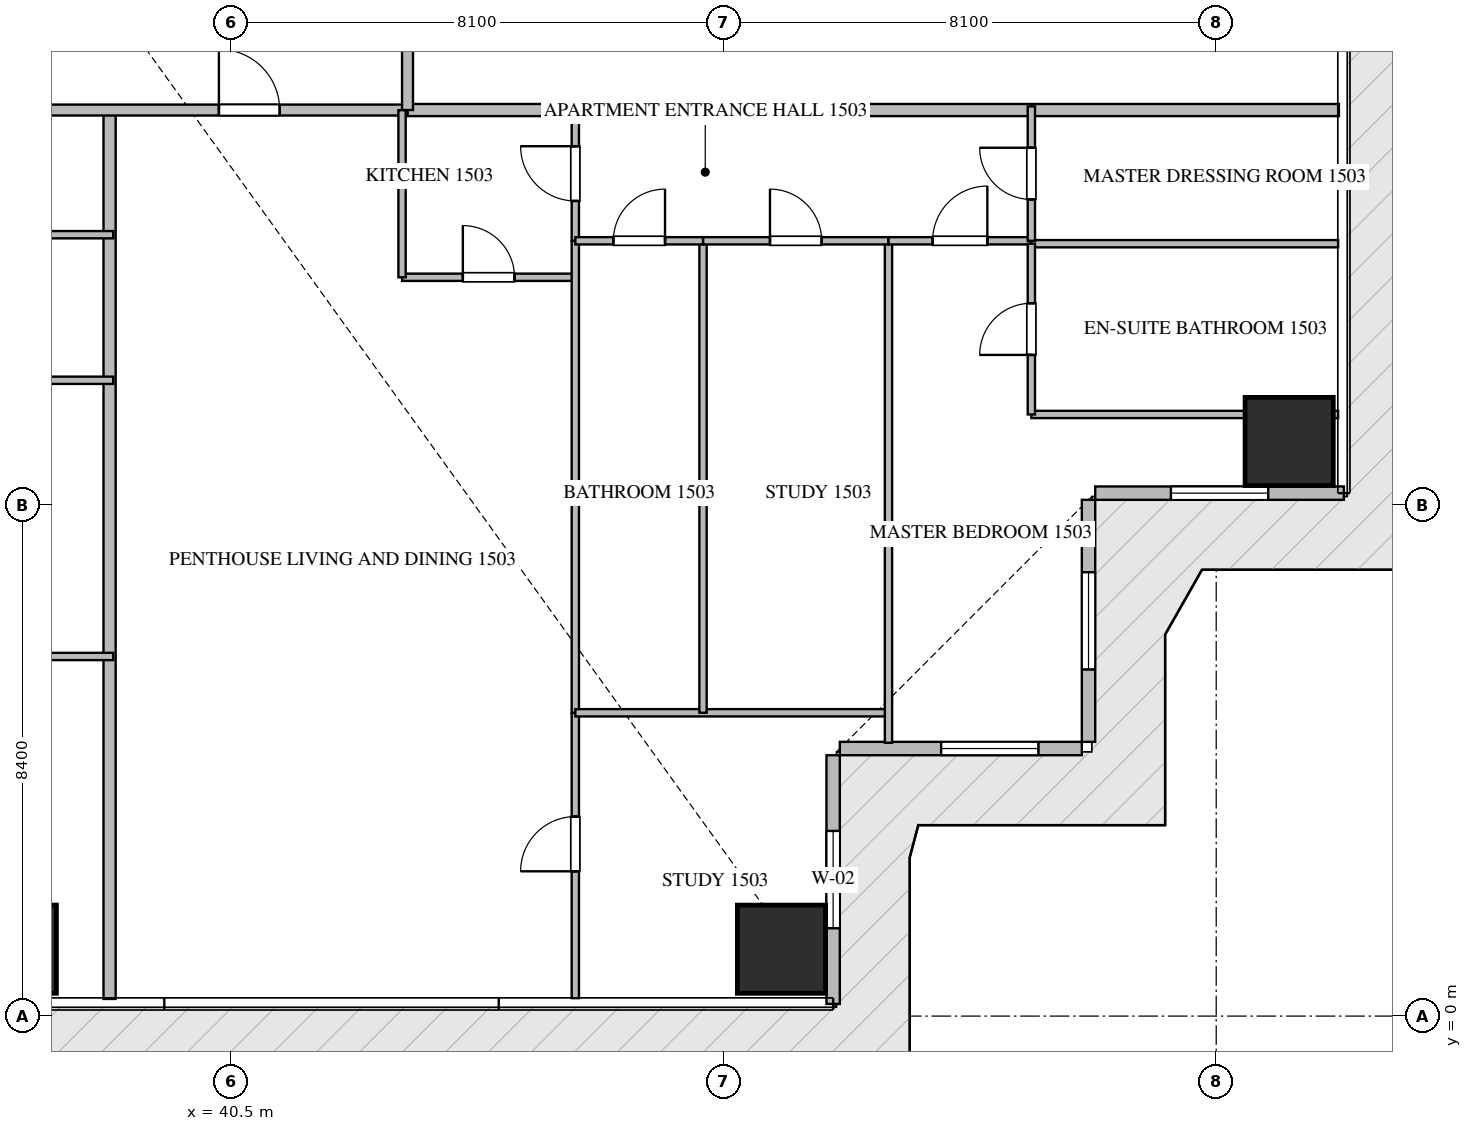
"""IFC4 building model, lengths in metres.
Left out: names, types, materials, properties, quantities, classifications, styles, units other than length and angle.
Written with IfcOpenShell. Run it as: python <this file> out.ifc"""

import sys

from ifc_helpers import new_model, si_unit, direction, frame, frame_2d, origin, origin_2d, place, context, subcontext, project, spatial, rectangle, extrude, source, transform, mapped, element, fill, save


model = new_model("IFC4")
c1 = context("Model", 3, precision=1e-05, world=origin(), true_north=direction((0.0, 1.0)))
c2 = subcontext(c1, "Body", "Model", "MODEL_VIEW")
j1 = project(units=[si_unit("LENGTHUNIT", "METRE"), si_unit("PLANEANGLEUNIT", "RADIAN")], contexts=[c1])
p1 = place(None, origin())
s1 = spatial("IfcSite", under=j1, at=p1, CompositionType="ELEMENT")
p2 = place(p1, origin())
s2 = spatial("IfcBuilding", under=s1, at=p2, CompositionType="ELEMENT")
p3 = place(p2, frame((0.0, 0.0, 64.2)))
s3 = spatial("IfcBuildingStorey", under=s2, at=p3, CompositionType="ELEMENT", Elevation=64.2)
m1 = source(origin(), c2, "Body", "SweptSolid", [
    extrude(rectangle(XDim=1.45, YDim=1.45, at=origin_2d()), origin(), (0.0, 0.0, 1.0), 3.75),
])
for number, where, z_axis, x_axis in (
    (1, (36.9, 1.1, -0.26), (0.0, 0.0, 1.0), (1.0, 0.0, 0.0)),
    (2, (49.55, 1.1, -0.26), (0.0, 0.0, 1.0), (1.0, 0.0, 0.0)),
    (3, (57.9, 9.45, -0.26), (0.0, 0.0, 1.0), (1.0, 0.0, 0.0)),
):
    element("IfcColumn", number, at=place(p3, frame(where, z_axis=z_axis, x_axis=x_axis)), inside=s3, PredefinedType="COLUMN", context=c2, shape_type="MappedRepresentation", body=[
        mapped(m1, transform((0.0, 0.0, 0.0), scale=1.0)),
    ])
p4 = place(p3, frame((50.4, 0.2, 0.0), z_axis=(0.0, 0.0, 1.0), x_axis=(0.0, 1.0, 0.0)))
e4 = element("IfcWall", 4, at=p4, inside=s3, PredefinedType="ELEMENTEDWALL", context=c2, shape_type="SweptSolid", body=[
    extrude(rectangle(XDim=4.09, YDim=0.22, at=frame_2d((2.045, 0.0))), origin(), (0.0, 0.0, 1.0), 3.475),
])
p5 = place(p4, frame((1.245, 0.0, 0.65)))
e5 = element("IfcOpeningElement", 5, at=p5, cuts=e4, PredefinedType="OPENING", context=c2, shape_type="SweptSolid", body=[
    extrude(rectangle(XDim=1.6, YDim=2.1, at=frame_2d((0.8, 1.05))), frame((0.0, 0.12, 0.0), z_axis=(0.0, -1.0, 0.0), x_axis=(1.0, 0.0, 0.0)), (0.0, 0.0, 1.0), 0.24),
])
p6 = place(p3, frame((50.51, 4.4, 0.0), z_axis=(0.0, 0.0, 1.0), x_axis=(1.0, 0.0, 0.0)))
e6 = element("IfcWall", 6, at=p6, inside=s3, PredefinedType="ELEMENTEDWALL", context=c2, shape_type="SweptSolid", body=[
    extrude(rectangle(XDim=3.98, YDim=0.22, at=frame_2d((1.99, 0.0))), origin(), (0.0, 0.0, 1.0), 3.475),
])
p7 = place(p6, frame((1.666, 0.0, 0.65)))
e7 = element("IfcOpeningElement", 7, at=p7, cuts=e6, PredefinedType="OPENING", context=c2, shape_type="SweptSolid", body=[
    extrude(rectangle(XDim=1.6, YDim=2.1, at=frame_2d((0.8, 1.05))), frame((0.0, 0.12, 0.0), z_axis=(0.0, -1.0, 0.0), x_axis=(1.0, 0.0, 0.0)), (0.0, 0.0, 1.0), 0.24),
])
p8 = place(p3, frame((54.6, 4.51, 0.0), z_axis=(0.0, 0.0, 1.0), x_axis=(0.0, 1.0, 0.0)))
e8 = element("IfcWall", 8, at=p8, inside=s3, PredefinedType="ELEMENTEDWALL", context=c2, shape_type="SweptSolid", body=[
    extrude(rectangle(XDim=3.98, YDim=0.22, at=frame_2d((1.99, 0.0))), origin(), (0.0, 0.0, 1.0), 3.475),
])
p9 = place(p8, frame((1.19, 0.0, 0.65)))
e9 = element("IfcOpeningElement", 9, at=p9, cuts=e8, PredefinedType="OPENING", context=c2, shape_type="SweptSolid", body=[
    extrude(rectangle(XDim=1.6, YDim=2.1, at=frame_2d((0.8, 1.05))), frame((0.0, 0.12, 0.0), z_axis=(0.0, -1.0, 0.0), x_axis=(1.0, 0.0, 0.0)), (0.0, 0.0, 1.0), 0.24),
])
p10 = place(p3, frame((54.71, 8.6, 0.0), z_axis=(0.0, 0.0, 1.0), x_axis=(1.0, 0.0, 0.0)))
e10 = element("IfcWall", 10, at=p10, inside=s3, PredefinedType="ELEMENTEDWALL", context=c2, shape_type="SweptSolid", body=[
    extrude(rectangle(XDim=4.09, YDim=0.22, at=frame_2d((2.045, 0.0))), origin(), (0.0, 0.0, 1.0), 3.475),
])
p11 = place(p10, frame((1.245, 0.0, 0.65)))
e11 = element("IfcOpeningElement", 11, at=p11, cuts=e10, PredefinedType="OPENING", context=c2, shape_type="SweptSolid", body=[
    extrude(rectangle(XDim=1.6, YDim=2.1, at=frame_2d((0.8, 1.05))), frame((0.0, 0.12, 0.0), z_axis=(0.0, -1.0, 0.0), x_axis=(1.0, 0.0, 0.0)), (0.0, 0.0, 1.0), 0.24),
])
p12 = place(p3, frame((38.5, 0.282, 0.0), z_axis=(0.0, 0.0, 1.0), x_axis=(0.0, 1.0, 0.0)))
e12 = element("IfcWall", 12, at=p12, inside=s3, PredefinedType="PARTITIONING", context=c2, shape_type="SweptSolid", body=[
    extrude(rectangle(XDim=14.618, YDim=0.2, at=frame_2d((7.309, 0.0))), origin(), (0.0, 0.0, 1.0), 3.49),
])
p13 = place(p3, frame((43.4, 14.9, 0.0), z_axis=(0.0, 0.0, 1.0), x_axis=(1.0, 0.0, 0.0)))
e13 = element("IfcWall", 13, at=p13, inside=s3, PredefinedType="PARTITIONING", context=c2, shape_type="SweptSolid", body=[
    extrude(rectangle(XDim=15.318, YDim=0.2, at=frame_2d((7.659, 0.0))), origin(), (0.0, 0.0, 1.0), 3.49),
])
p14 = place(p3, frame((21.402, 14.9, 0.0), z_axis=(0.0, 0.0, 1.0), x_axis=(1.0, 0.0, 0.0)))
e14 = element("IfcWall", 14, at=p14, inside=s3, PredefinedType="PARTITIONING", context=c2, shape_type="SweptSolid", body=[
    extrude(rectangle(XDim=21.996, YDim=0.18, at=frame_2d((10.998, 0.0))), origin(), (0.0, 0.0, 1.0), 3.49),
])
p15 = place(p14, frame((2.1, 0.0, 0.0)))
e15 = element("IfcOpeningElement", 15, at=p15, cuts=e14, PredefinedType="OPENING", context=c2, shape_type="SweptSolid", body=[
    extrude(rectangle(XDim=1.0, YDim=2.15, at=frame_2d((0.5, 1.075))), frame((0.0, 0.1, 0.0), z_axis=(0.0, -1.0, 0.0), x_axis=(1.0, 0.0, 0.0)), (0.0, 0.0, 1.0), 0.2),
])
p16 = place(p14, frame((6.719, 0.0, 0.0)))
e16 = element("IfcOpeningElement", 16, at=p16, cuts=e14, PredefinedType="OPENING", context=c2, shape_type="SweptSolid", body=[
    extrude(rectangle(XDim=1.0, YDim=2.15, at=frame_2d((0.5, 1.075))), frame((0.0, 0.1, 0.0), z_axis=(0.0, -1.0, 0.0), x_axis=(1.0, 0.0, 0.0)), (0.0, 0.0, 1.0), 0.2),
])
p17 = place(p14, frame((18.896, 0.0, 0.0)))
e17 = element("IfcOpeningElement", 17, at=p17, cuts=e14, PredefinedType="OPENING", context=c2, shape_type="SweptSolid", body=[
    extrude(rectangle(XDim=1.0, YDim=2.15, at=frame_2d((0.5, 1.075))), frame((0.0, 0.1, 0.0), z_axis=(0.0, -1.0, 0.0), x_axis=(1.0, 0.0, 0.0)), (0.0, 0.0, 1.0), 0.2),
])
p18 = place(p3, frame((43.4, 14.9, 0.0), z_axis=(0.0, 0.0, 1.0), x_axis=(0.0, 1.0, 0.0)))
e18 = element("IfcWall", 18, at=p18, inside=s3, PredefinedType="PARTITIONING", context=c2, shape_type="SweptSolid", body=[
    extrude(rectangle(XDim=20.6, YDim=0.18, at=frame_2d((10.3, 0.0))), origin(), (0.0, 0.0, 1.0), 3.49),
])
p19 = place(p18, frame((1.96, 0.0, 0.0)))
e19 = element("IfcOpeningElement", 19, at=p19, cuts=e18, PredefinedType="OPENING", context=c2, shape_type="SweptSolid", body=[
    extrude(rectangle(XDim=1.0, YDim=2.15, at=frame_2d((0.5, 1.075))), frame((0.0, 0.1, 0.0), z_axis=(0.0, -1.0, 0.0), x_axis=(1.0, 0.0, 0.0)), (0.0, 0.0, 1.0), 0.2),
])
for number, where, z_axis, x_axis in (
    (20, (30.94, 5.914, 0.0), (0.0, 0.0, 1.0), (1.0, 0.0, 0.0)),
    (21, (30.94, 10.456, 0.0), (0.0, 0.0, 1.0), (1.0, 0.0, 0.0)),
    (22, (30.94, 12.85, 0.0), (0.0, 0.0, 1.0), (1.0, 0.0, 0.0)),
):
    element("IfcWall", number, at=place(p3, frame(where, z_axis=z_axis, x_axis=x_axis)), inside=s3, PredefinedType="PARTITIONING", context=c2, shape_type="SweptSolid", body=[
        extrude(rectangle(XDim=7.62, YDim=0.12, at=frame_2d((3.81, 0.0))), origin(), (0.0, 0.0, 1.0), 3.49),
    ])
p20 = place(p3, frame((43.31, 12.15, 0.0), z_axis=(0.0, 0.0, 1.0), x_axis=(1.0, 0.0, 0.0)))
e23 = element("IfcWall", 23, at=p20, inside=s3, PredefinedType="PARTITIONING", context=c2, shape_type="SweptSolid", body=[
    extrude(rectangle(XDim=2.85, YDim=0.12, at=frame_2d((1.425, 0.0))), origin(), (0.0, 0.0, 1.0), 3.49),
])
p21 = place(p20, frame((1.0, 0.0, 0.0)))
e24 = element("IfcOpeningElement", 24, at=p21, cuts=e23, PredefinedType="OPENING", context=c2, shape_type="SweptSolid", body=[
    extrude(rectangle(XDim=0.85, YDim=2.1, at=frame_2d((0.425, 1.05))), frame((0.0, 0.07, 0.0), z_axis=(0.0, -1.0, 0.0), x_axis=(1.0, 0.0, 0.0)), (0.0, 0.0, 1.0), 0.14),
])
p22 = place(p3, frame((43.31, 12.15, 0.0), z_axis=(0.0, 0.0, 1.0), x_axis=(0.0, 1.0, 0.0)))
e25 = element("IfcWall", 25, at=p22, inside=s3, PredefinedType="PARTITIONING", context=c2, shape_type="SweptSolid", body=[
    extrude(rectangle(XDim=2.748, YDim=0.12, at=frame_2d((1.374, 0.0))), origin(), (0.0, 0.0, 1.0), 3.49),
])
p23 = place(p3, frame((46.16, 12.75, 0.0), z_axis=(0.0, 0.0, 1.0), x_axis=(0.0, 1.0, 0.0)))
e26 = element("IfcWall", 26, at=p23, inside=s3, PredefinedType="PARTITIONING", context=c2, shape_type="SweptSolid", body=[
    extrude(rectangle(XDim=2.21, YDim=0.12, at=frame_2d((1.105, 0.0))), origin(), (0.0, 0.0, 1.0), 3.49),
])
p24 = place(p23, frame((0.655, 0.0, 0.0)))
e27 = element("IfcOpeningElement", 27, at=p24, cuts=e26, PredefinedType="OPENING", context=c2, shape_type="SweptSolid", body=[
    extrude(rectangle(XDim=0.9, YDim=2.1, at=frame_2d((0.45, 1.05))), frame((0.0, 0.07, 0.0), z_axis=(0.0, -1.0, 0.0), x_axis=(1.0, 0.0, 0.0)), (0.0, 0.0, 1.0), 0.14),
])
p25 = place(p3, frame((46.16, 0.295, 0.0), z_axis=(0.0, 0.0, 1.0), x_axis=(0.0, 1.0, 0.0)))
e28 = element("IfcWall", 28, at=p25, inside=s3, PredefinedType="PARTITIONING", context=c2, shape_type="SweptSolid", body=[
    extrude(rectangle(XDim=4.693, YDim=0.12, at=frame_2d((2.347, 0.0))), origin(), (0.0, 0.0, 1.0), 3.49),
])
p26 = place(p25, frame((2.086, 0.0, 0.0)))
e29 = element("IfcOpeningElement", 29, at=p26, cuts=e28, PredefinedType="OPENING", context=c2, shape_type="SweptSolid", body=[
    extrude(rectangle(XDim=0.9, YDim=2.1, at=frame_2d((0.45, 1.05))), frame((0.0, 0.07, 0.0), z_axis=(0.0, -1.0, 0.0), x_axis=(1.0, 0.0, 0.0)), (0.0, 0.0, 1.0), 0.14),
])
p27 = place(p3, frame((46.16, 4.99, 0.0), z_axis=(0.0, 0.0, 1.0), x_axis=(0.0, 1.0, 0.0)))
e30 = element("IfcWall", 30, at=p27, inside=s3, PredefinedType="PARTITIONING", context=c2, shape_type="SweptSolid", body=[
    extrude(rectangle(XDim=7.758, YDim=0.12, at=frame_2d((3.879, 0.0))), origin(), (0.0, 0.0, 1.0), 3.49),
])
p28 = place(p3, frame((46.16, 4.988, 0.0), z_axis=(0.0, 0.0, 1.0), x_axis=(1.0, 0.0, 0.0)))
e31 = element("IfcWall", 31, at=p28, inside=s3, PredefinedType="PARTITIONING", context=c2, shape_type="SweptSolid", body=[
    extrude(rectangle(XDim=5.15, YDim=0.12, at=frame_2d((2.575, 0.0))), origin(), (0.0, 0.0, 1.0), 3.49),
])
p29 = place(p3, frame((51.31, 4.495, 0.0), z_axis=(0.0, 0.0, 1.0), x_axis=(0.0, 1.0, 0.0)))
e32 = element("IfcWall", 32, at=p29, inside=s3, PredefinedType="PARTITIONING", context=c2, shape_type="SweptSolid", body=[
    extrude(rectangle(XDim=8.255, YDim=0.12, at=frame_2d((4.127, 0.0))), origin(), (0.0, 0.0, 1.0), 3.49),
])
p30 = place(p3, frame((48.26, 4.988, 0.0), z_axis=(0.0, 0.0, 1.0), x_axis=(0.0, 1.0, 0.0)))
e33 = element("IfcWall", 33, at=p30, inside=s3, PredefinedType="PARTITIONING", context=c2, shape_type="SweptSolid", body=[
    extrude(rectangle(XDim=7.762, YDim=0.12, at=frame_2d((3.881, 0.0))), origin(), (0.0, 0.0, 1.0), 3.49),
])
p31 = place(p3, frame((46.16, 12.75, 0.0), z_axis=(0.0, 0.0, 1.0), x_axis=(1.0, 0.0, 0.0)))
e34 = element("IfcWall", 34, at=p31, inside=s3, PredefinedType="PARTITIONING", context=c2, shape_type="SweptSolid", body=[
    extrude(rectangle(XDim=2.1, YDim=0.12, at=frame_2d((1.05, 0.0))), origin(), (0.0, 0.0, 1.0), 3.49),
])
p32 = place(p31, frame((0.625, 0.0, 0.0)))
e35 = element("IfcOpeningElement", 35, at=p32, cuts=e34, PredefinedType="OPENING", context=c2, shape_type="SweptSolid", body=[
    extrude(rectangle(XDim=0.85, YDim=2.1, at=frame_2d((0.425, 1.05))), frame((0.0, 0.07, 0.0), z_axis=(0.0, -1.0, 0.0), x_axis=(1.0, 0.0, 0.0)), (0.0, 0.0, 1.0), 0.14),
])
p33 = place(p3, frame((48.262, 12.75, 0.0), z_axis=(0.0, 0.0, 1.0), x_axis=(1.0, 0.0, 0.0)))
e36 = element("IfcWall", 36, at=p33, inside=s3, PredefinedType="PARTITIONING", context=c2, shape_type="SweptSolid", body=[
    extrude(rectangle(XDim=3.048, YDim=0.12, at=frame_2d((1.524, 0.0))), origin(), (0.0, 0.0, 1.0), 3.49),
])
p34 = place(p33, frame((1.099, 0.0, 0.0)))
e37 = element("IfcOpeningElement", 37, at=p34, cuts=e36, PredefinedType="OPENING", context=c2, shape_type="SweptSolid", body=[
    extrude(rectangle(XDim=0.85, YDim=2.1, at=frame_2d((0.425, 1.05))), frame((0.0, 0.07, 0.0), z_axis=(0.0, -1.0, 0.0), x_axis=(1.0, 0.0, 0.0)), (0.0, 0.0, 1.0), 0.14),
])
p35 = place(p3, frame((51.312, 12.75, 0.0), z_axis=(0.0, 0.0, 1.0), x_axis=(1.0, 0.0, 0.0)))
e38 = element("IfcWall", 38, at=p35, inside=s3, PredefinedType="PARTITIONING", context=c2, shape_type="SweptSolid", body=[
    extrude(rectangle(XDim=2.348, YDim=0.12, at=frame_2d((1.174, 0.0))), origin(), (0.0, 0.0, 1.0), 3.49),
])
p36 = place(p35, frame((0.724, 0.0, 0.0)))
e39 = element("IfcOpeningElement", 39, at=p36, cuts=e38, PredefinedType="OPENING", context=c2, shape_type="SweptSolid", body=[
    extrude(rectangle(XDim=0.9, YDim=2.1, at=frame_2d((0.45, 1.05))), frame((0.0, 0.07, 0.0), z_axis=(0.0, -1.0, 0.0), x_axis=(1.0, 0.0, 0.0)), (0.0, 0.0, 1.0), 0.14),
])
p37 = place(p3, frame((53.66, 9.894, 0.0), z_axis=(0.0, 0.0, 1.0), x_axis=(1.0, 0.0, 0.0)))
e40 = element("IfcWall", 40, at=p37, inside=s3, PredefinedType="PARTITIONING", context=c2, shape_type="SweptSolid", body=[
    extrude(rectangle(XDim=5.045, YDim=0.12, at=frame_2d((2.522, 0.0))), origin(), (0.0, 0.0, 1.0), 3.49),
])
p38 = place(p3, frame((53.662, 12.702, 0.0), z_axis=(0.0, 0.0, 1.0), x_axis=(1.0, 0.0, 0.0)))
e41 = element("IfcWall", 41, at=p38, inside=s3, PredefinedType="PARTITIONING", context=c2, shape_type="SweptSolid", body=[
    extrude(rectangle(XDim=5.043, YDim=0.12, at=frame_2d((2.521, 0.0))), origin(), (0.0, 0.0, 1.0), 3.49),
])
p39 = place(p3, frame((53.66, 9.894, 0.0), z_axis=(0.0, 0.0, 1.0), x_axis=(0.0, 1.0, 0.0)))
e42 = element("IfcWall", 42, at=p39, inside=s3, PredefinedType="PARTITIONING", context=c2, shape_type="SweptSolid", body=[
    extrude(rectangle(XDim=2.808, YDim=0.12, at=frame_2d((1.404, 0.0))), origin(), (0.0, 0.0, 1.0), 3.49),
])
p40 = place(p39, frame((0.979, 0.0, 0.0)))
e43 = element("IfcOpeningElement", 43, at=p40, cuts=e42, PredefinedType="OPENING", context=c2, shape_type="SweptSolid", body=[
    extrude(rectangle(XDim=0.85, YDim=2.1, at=frame_2d((0.425, 1.05))), frame((0.0, 0.07, 0.0), z_axis=(0.0, -1.0, 0.0), x_axis=(1.0, 0.0, 0.0)), (0.0, 0.0, 1.0), 0.14),
])
p41 = place(p3, frame((53.66, 12.75, 0.0), z_axis=(0.0, 0.0, 1.0), x_axis=(0.0, 1.0, 0.0)))
e44 = element("IfcWall", 44, at=p41, inside=s3, PredefinedType="PARTITIONING", context=c2, shape_type="SweptSolid", body=[
    extrude(rectangle(XDim=2.21, YDim=0.12, at=frame_2d((1.105, 0.0))), origin(), (0.0, 0.0, 1.0), 3.49),
])
p42 = place(p41, frame((0.68, 0.0, 0.0)))
e45 = element("IfcOpeningElement", 45, at=p42, cuts=e44, PredefinedType="OPENING", context=c2, shape_type="SweptSolid", body=[
    extrude(rectangle(XDim=0.85, YDim=2.1, at=frame_2d((0.425, 1.05))), frame((0.0, 0.07, 0.0), z_axis=(0.0, -1.0, 0.0), x_axis=(1.0, 0.0, 0.0)), (0.0, 0.0, 1.0), 0.14),
])
m2 = source(origin(), c2, "Body", "SweptSolid", [
    extrude(rectangle(XDim=1.6, YDim=2.1, at=frame_2d((0.8, 1.05))), frame((0.0, 0.03, 0.0), z_axis=(0.0, -1.0, 0.0), x_axis=(1.0, 0.0, 0.0)), (0.0, 0.0, 1.0), 0.06),
])
p43 = place(p5, origin())
e46 = element("IfcWindow", 46, at=p43, inside=s3, PartitioningType="SINGLE_PANEL", PredefinedType="WINDOW", context=c2, shape_type="MappedRepresentation", body=[
    mapped(m2, transform((0.0, 0.0, 0.0), scale=1.0)),
])
fill(e5, e46)
p44 = place(p7, origin())
e47 = element("IfcWindow", 47, at=p44, inside=s3, PartitioningType="SINGLE_PANEL", PredefinedType="WINDOW", context=c2, shape_type="MappedRepresentation", body=[
    mapped(m2, transform((0.0, 0.0, 0.0), scale=1.0)),
])
fill(e7, e47)
p45 = place(p9, origin())
e48 = element("IfcWindow", 48, at=p45, inside=s3, PartitioningType="SINGLE_PANEL", PredefinedType="WINDOW", context=c2, shape_type="MappedRepresentation", body=[
    mapped(m2, transform((0.0, 0.0, 0.0), scale=1.0)),
])
fill(e9, e48)
p46 = place(p11, origin())
e49 = element("IfcWindow", 49, at=p46, inside=s3, PartitioningType="SINGLE_PANEL", PredefinedType="WINDOW", context=c2, shape_type="MappedRepresentation", body=[
    mapped(m2, transform((0.0, 0.0, 0.0), scale=1.0)),
])
fill(e11, e49)
m3 = source(origin(), c2, "Body", "SweptSolid", [
    extrude(rectangle(XDim=1.0, YDim=2.15, at=frame_2d((0.5, 1.075))), frame((0.0, 0.025, 0.0), z_axis=(0.0, -1.0, 0.0), x_axis=(1.0, 0.0, 0.0)), (0.0, 0.0, 1.0), 0.05),
])
p47 = place(p17, origin())
e50 = element("IfcDoor", 50, at=p47, inside=s3, OperationType="SINGLE_SWING_LEFT", PredefinedType="DOOR", context=c2, shape_type="MappedRepresentation", body=[
    mapped(m3, transform((0.0, 0.0, 0.0), scale=1.0)),
])
fill(e17, e50)
m4 = source(origin(), c2, "Body", "SweptSolid", [
    extrude(rectangle(XDim=0.85, YDim=2.1, at=frame_2d((0.425, 1.05))), frame((0.0, 0.025, 0.0), z_axis=(0.0, -1.0, 0.0), x_axis=(1.0, 0.0, 0.0)), (0.0, 0.0, 1.0), 0.05),
])
p48 = place(p21, origin())
e51 = element("IfcDoor", 51, at=p48, inside=s3, OperationType="SINGLE_SWING_LEFT", PredefinedType="DOOR", context=c2, shape_type="MappedRepresentation", body=[
    mapped(m4, transform((0.0, 0.0, 0.0), scale=1.0)),
])
fill(e24, e51)
m5 = source(origin(), c2, "Body", "SweptSolid", [
    extrude(rectangle(XDim=0.9, YDim=2.1, at=frame_2d((0.45, 1.05))), frame((0.0, 0.025, 0.0), z_axis=(0.0, -1.0, 0.0), x_axis=(1.0, 0.0, 0.0)), (0.0, 0.0, 1.0), 0.05),
])
p49 = place(p24, origin())
e52 = element("IfcDoor", 52, at=p49, inside=s3, OperationType="SINGLE_SWING_RIGHT", PredefinedType="DOOR", context=c2, shape_type="MappedRepresentation", body=[
    mapped(m5, transform((0.0, 0.0, 0.0), scale=1.0)),
])
fill(e27, e52)
p50 = place(p26, origin())
e53 = element("IfcDoor", 53, at=p50, inside=s3, OperationType="SINGLE_SWING_LEFT", PredefinedType="DOOR", context=c2, shape_type="MappedRepresentation", body=[
    mapped(m5, transform((0.0, 0.0, 0.0), scale=1.0)),
])
fill(e29, e53)
p51 = place(p32, origin())
e54 = element("IfcDoor", 54, at=p51, inside=s3, OperationType="SINGLE_SWING_RIGHT", PredefinedType="DOOR", context=c2, shape_type="MappedRepresentation", body=[
    mapped(m4, transform((0.0, 0.0, 0.0), scale=1.0)),
])
fill(e35, e54)
p52 = place(p34, origin())
e55 = element("IfcDoor", 55, at=p52, inside=s3, OperationType="SINGLE_SWING_LEFT", PredefinedType="DOOR", context=c2, shape_type="MappedRepresentation", body=[
    mapped(m4, transform((0.0, 0.0, 0.0), scale=1.0)),
])
fill(e37, e55)
p53 = place(p36, origin())
e56 = element("IfcDoor", 56, at=p53, inside=s3, OperationType="SINGLE_SWING_RIGHT", PredefinedType="DOOR", context=c2, shape_type="MappedRepresentation", body=[
    mapped(m5, transform((0.0, 0.0, 0.0), scale=1.0)),
])
fill(e39, e56)
p54 = place(p40, origin())
e57 = element("IfcDoor", 57, at=p54, inside=s3, OperationType="SINGLE_SWING_LEFT", PredefinedType="DOOR", context=c2, shape_type="MappedRepresentation", body=[
    mapped(m4, transform((0.0, 0.0, 0.0), scale=1.0)),
])
fill(e43, e57)
p55 = place(p42, origin())
e58 = element("IfcDoor", 58, at=p55, inside=s3, OperationType="SINGLE_SWING_RIGHT", PredefinedType="DOOR", context=c2, shape_type="MappedRepresentation", body=[
    mapped(m4, transform((0.0, 0.0, 0.0), scale=1.0)),
])
fill(e45, e58)
save(model, sys.argv[1])
